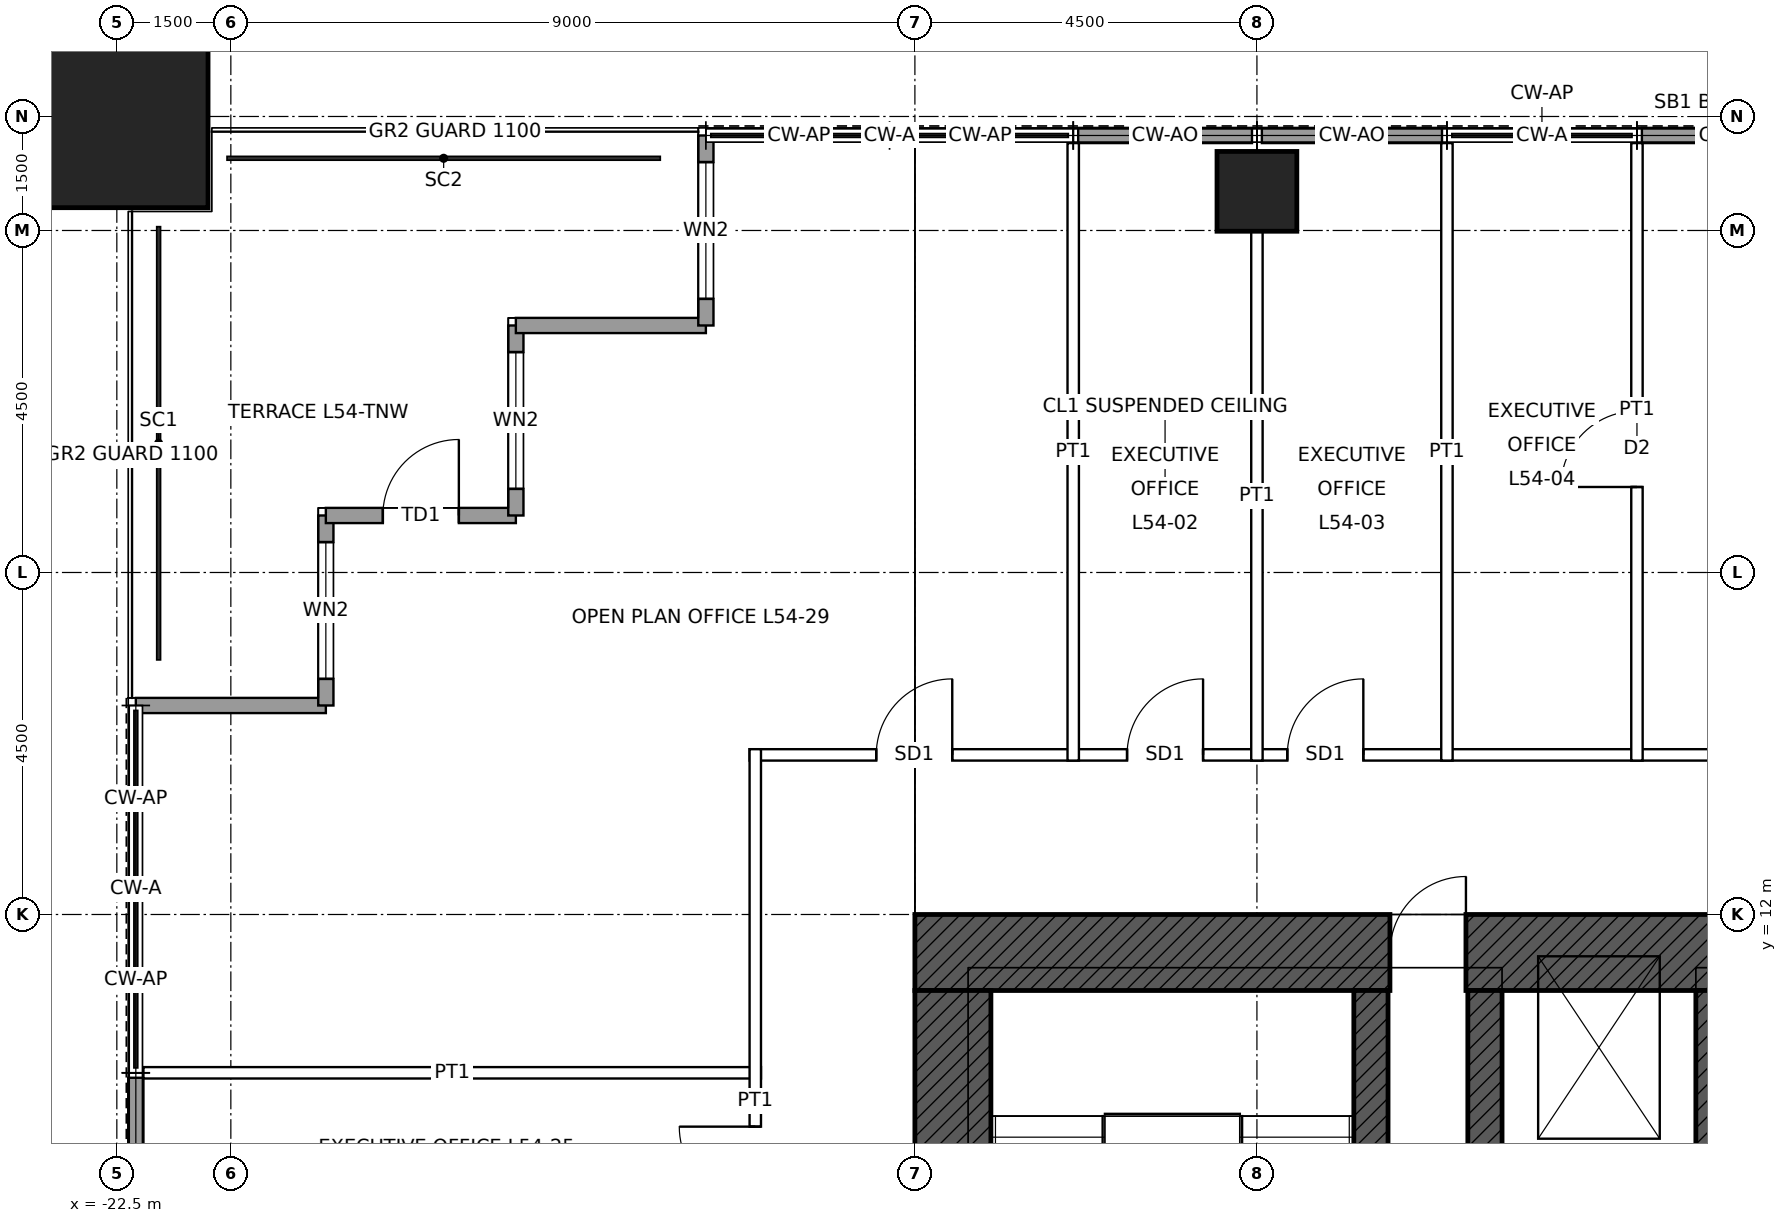
"""IFC4 building model, lengths in metres.
Left out: names, types, materials, properties, quantities, classifications, styles, units other than length and angle.
Written with IfcOpenShell. Run it as: python <this file> out.ifc"""

import sys

from ifc_helpers import new_model, si_unit, direction, frame, frame_2d, origin, origin_2d, place, context, subcontext, project, spatial, rectangle, hollow_rectangle, extrude, element, fill, save


model = new_model("IFC4")
c1 = context("Model", 3, precision=1e-05, world=origin(), true_north=direction((0.0, 1.0)))
c2 = subcontext(c1, "Body", "Model", "MODEL_VIEW")
j1 = project(units=[si_unit("LENGTHUNIT", "METRE"), si_unit("PLANEANGLEUNIT", "RADIAN")], contexts=[c1])
p1 = place(None, origin())
s1 = spatial("IfcSite", under=j1, at=p1, CompositionType="ELEMENT")
p2 = place(p1, origin())
s2 = spatial("IfcBuilding", under=s1, at=p2, CompositionType="ELEMENT")
p3 = place(p2, frame((0.0, 0.0, 249.9)))
s3 = spatial("IfcBuildingStorey", under=s2, at=p3, CompositionType="ELEMENT", Elevation=249.9)
p4 = place(p3, frame((-22.5, 22.5, 0.0), z_axis=(0.0, 0.0, 1.0), x_axis=(1.0, 0.0, 0.0)))
e1 = element("IfcColumn", 1, at=p4, inside=s3, PredefinedType="COLUMN", context=c2, shape_type="SweptSolid", body=[
    extrude(hollow_rectangle(XDim=2.4, YDim=2.4, WallThickness=0.12, at=origin_2d()), origin(), (0.0, 0.0, 1.0), 4.0),
])
p5 = place(p3, frame((-7.5, 21.515, 0.0), z_axis=(0.0, 0.0, 1.0), x_axis=(1.0, 0.0, 0.0)))
e2 = element("IfcColumn", 2, at=p5, inside=s3, PredefinedType="COLUMN", context=c2, shape_type="SweptSolid", body=[
    extrude(hollow_rectangle(XDim=1.05, YDim=1.05, WallThickness=0.07, at=origin_2d()), origin(), (0.0, 0.0, 1.0), 4.0),
])
p6 = place(p3, frame((-12.0, 11.5, 0.0), z_axis=(0.0, 0.0, 1.0), x_axis=(1.0, 0.0, 0.0)))
e3 = element("IfcWall", 3, at=p6, inside=s3, PredefinedType="SHEAR", context=c2, shape_type="SweptSolid", body=[
    extrude(rectangle(XDim=24.0, YDim=1.0, at=frame_2d((12.0, 0.0))), origin(), (0.0, 0.0, 1.0), 4.0),
])
p7 = place(p6, frame((6.25, 0.0, 0.0)))
e4 = element("IfcOpeningElement", 4, at=p7, cuts=e3, PredefinedType="OPENING", context=c2, shape_type="SweptSolid", body=[
    extrude(rectangle(XDim=1.0, YDim=2.4, at=frame_2d((0.5, 1.2))), frame((0.0, 0.51, 0.0), z_axis=(0.0, -1.0, 0.0), x_axis=(1.0, 0.0, 0.0)), (0.0, 0.0, 1.0), 1.02),
])
p8 = place(p6, frame((16.75, 0.0, 0.0)))
e5 = element("IfcOpeningElement", 5, at=p8, cuts=e3, PredefinedType="OPENING", context=c2, shape_type="SweptSolid", body=[
    extrude(rectangle(XDim=1.0, YDim=2.4, at=frame_2d((0.5, 1.2))), frame((0.0, 0.51, 0.0), z_axis=(0.0, -1.0, 0.0), x_axis=(1.0, 0.0, 0.0)), (0.0, 0.0, 1.0), 1.02),
])
p9 = place(p3, frame((-11.5, -11.0, 0.0), z_axis=(0.0, 0.0, 1.0), x_axis=(0.0, 1.0, 0.0)))
e6 = element("IfcWall", 6, at=p9, inside=s3, PredefinedType="SHEAR", context=c2, shape_type="SweptSolid", body=[
    extrude(rectangle(XDim=22.0, YDim=1.0, at=frame_2d((11.0, 0.0))), origin(), (0.0, 0.0, 1.0), 4.0),
])
p10 = place(p9, frame((10.5, 0.0, 0.0)))
e7 = element("IfcOpeningElement", 7, at=p10, cuts=e6, PredefinedType="OPENING", context=c2, shape_type="SweptSolid", body=[
    extrude(rectangle(XDim=1.0, YDim=2.4, at=frame_2d((0.5, 1.2))), frame((0.0, 0.51, 0.0), z_axis=(0.0, -1.0, 0.0), x_axis=(1.0, 0.0, 0.0)), (0.0, 0.0, 1.0), 1.02),
])
p11 = place(p3, frame((-6.0, 4.5, 0.0), z_axis=(0.0, 0.0, 1.0), x_axis=(0.0, 1.0, 0.0)))
e8 = element("IfcWall", 8, at=p11, inside=s3, PredefinedType="SHEAR", context=c2, shape_type="SweptSolid", body=[
    extrude(rectangle(XDim=6.5, YDim=0.45, at=frame_2d((3.25, 0.0))), origin(), (0.0, 0.0, 1.0), 4.0),
])
p12 = place(p11, frame((0.6, 0.0, 0.0)))
e9 = element("IfcOpeningElement", 9, at=p12, cuts=e8, PredefinedType="OPENING", context=c2, shape_type="SweptSolid", body=[
    extrude(rectangle(XDim=1.0, YDim=2.1, at=frame_2d((0.5, 1.05))), frame((0.0, 0.235, 0.0), z_axis=(0.0, -1.0, 0.0), x_axis=(1.0, 0.0, 0.0)), (0.0, 0.0, 1.0), 0.47),
])
for number, where, z_axis, x_axis in (
    (10, (-4.5, 8.5, 0.0), (0.0, 0.0, 1.0), (0.0, 1.0, 0.0)),
    (11, (-1.5, 8.5, 0.0), (0.0, 0.0, 1.0), (0.0, 1.0, 0.0)),
):
    element("IfcWall", number, at=place(p3, frame(where, z_axis=z_axis, x_axis=x_axis)), inside=s3, PredefinedType="SHEAR", context=c2, shape_type="SweptSolid", body=[
        extrude(rectangle(XDim=2.5, YDim=0.45, at=frame_2d((1.25, 0.0))), origin(), (0.0, 0.0, 1.0), 4.0),
    ])
p13 = place(p3, frame((-22.25, 14.75, 0.0), z_axis=(0.0, 0.0, 1.0), x_axis=(1.0, 0.0, 0.0)))
e12 = element("IfcWall", 12, at=p13, inside=s3, PredefinedType="SOLIDWALL", context=c2, shape_type="SweptSolid", body=[
    extrude(rectangle(XDim=2.5, YDim=0.2, at=frame_2d((1.25, 0.0))), origin(), (0.0, 0.0, 1.0), 3.75),
])
p14 = place(p3, frame((-19.75, 14.75, 0.0), z_axis=(0.0, 0.0, 1.0), x_axis=(0.0, 1.0, 0.0)))
e13 = element("IfcWall", 13, at=p14, inside=s3, PredefinedType="SOLIDWALL", context=c2, shape_type="SweptSolid", body=[
    extrude(rectangle(XDim=2.5, YDim=0.2, at=frame_2d((1.25, 0.0))), origin(), (0.0, 0.0, 1.0), 3.75),
])
p15 = place(p14, frame((0.35, 0.0, 0.3)))
e14 = element("IfcOpeningElement", 14, at=p15, cuts=e13, PredefinedType="OPENING", context=c2, shape_type="SweptSolid", body=[
    extrude(rectangle(XDim=1.8, YDim=2.4, at=frame_2d((0.9, 1.2))), frame((0.0, 0.11, 0.0), z_axis=(0.0, -1.0, 0.0), x_axis=(1.0, 0.0, 0.0)), (0.0, 0.0, 1.0), 0.22),
])
p16 = place(p3, frame((-19.75, 17.25, 0.0), z_axis=(0.0, 0.0, 1.0), x_axis=(1.0, 0.0, 0.0)))
e15 = element("IfcWall", 15, at=p16, inside=s3, PredefinedType="SOLIDWALL", context=c2, shape_type="SweptSolid", body=[
    extrude(rectangle(XDim=2.5, YDim=0.2, at=frame_2d((1.25, 0.0))), origin(), (0.0, 0.0, 1.0), 3.75),
])
p17 = place(p16, frame((0.75, 0.0, 0.0)))
e16 = element("IfcOpeningElement", 16, at=p17, cuts=e15, PredefinedType="OPENING", context=c2, shape_type="SweptSolid", body=[
    extrude(rectangle(XDim=1.0, YDim=2.4, at=frame_2d((0.5, 1.2))), frame((0.0, 0.11, 0.0), z_axis=(0.0, -1.0, 0.0), x_axis=(1.0, 0.0, 0.0)), (0.0, 0.0, 1.0), 0.22),
])
p18 = place(p3, frame((-17.25, 17.25, 0.0), z_axis=(0.0, 0.0, 1.0), x_axis=(0.0, 1.0, 0.0)))
e17 = element("IfcWall", 17, at=p18, inside=s3, PredefinedType="SOLIDWALL", context=c2, shape_type="SweptSolid", body=[
    extrude(rectangle(XDim=2.5, YDim=0.2, at=frame_2d((1.25, 0.0))), origin(), (0.0, 0.0, 1.0), 3.75),
])
p19 = place(p18, frame((0.35, 0.0, 0.3)))
e18 = element("IfcOpeningElement", 18, at=p19, cuts=e17, PredefinedType="OPENING", context=c2, shape_type="SweptSolid", body=[
    extrude(rectangle(XDim=1.8, YDim=2.4, at=frame_2d((0.9, 1.2))), frame((0.0, 0.11, 0.0), z_axis=(0.0, -1.0, 0.0), x_axis=(1.0, 0.0, 0.0)), (0.0, 0.0, 1.0), 0.22),
])
p20 = place(p3, frame((-17.25, 19.75, 0.0), z_axis=(0.0, 0.0, 1.0), x_axis=(1.0, 0.0, 0.0)))
e19 = element("IfcWall", 19, at=p20, inside=s3, PredefinedType="SOLIDWALL", context=c2, shape_type="SweptSolid", body=[
    extrude(rectangle(XDim=2.5, YDim=0.2, at=frame_2d((1.25, 0.0))), origin(), (0.0, 0.0, 1.0), 3.75),
])
p21 = place(p3, frame((-14.75, 19.75, 0.0), z_axis=(0.0, 0.0, 1.0), x_axis=(0.0, 1.0, 0.0)))
e20 = element("IfcWall", 20, at=p21, inside=s3, PredefinedType="SOLIDWALL", context=c2, shape_type="SweptSolid", body=[
    extrude(rectangle(XDim=2.5, YDim=0.2, at=frame_2d((1.25, 0.0))), origin(), (0.0, 0.0, 1.0), 3.75),
])
p22 = place(p21, frame((0.35, 0.0, 0.3)))
e21 = element("IfcOpeningElement", 21, at=p22, cuts=e20, PredefinedType="OPENING", context=c2, shape_type="SweptSolid", body=[
    extrude(rectangle(XDim=1.8, YDim=2.4, at=frame_2d((0.9, 1.2))), frame((0.0, 0.11, 0.0), z_axis=(0.0, -1.0, 0.0), x_axis=(1.0, 0.0, 0.0)), (0.0, 0.0, 1.0), 0.22),
])
p23 = place(p3, frame((-9.852, 22.25, 0.0), z_axis=(0.0, 0.0, 1.0), x_axis=(1.0, 0.0, 0.0)))
e22 = element("IfcWall", 22, at=p23, inside=s3, PredefinedType="SOLIDWALL", context=c2, shape_type="SweptSolid", body=[
    extrude(rectangle(XDim=2.287, YDim=0.2, at=frame_2d((1.144, 0.0))), origin(), (0.0, 0.0, 1.0), 3.75),
])
for number, where, z_axis, x_axis in (
    (23, (-7.435, 22.25, 0.0), (0.0, 0.0, 1.0), (1.0, 0.0, 0.0)),
    (24, (-2.435, 22.25, 0.0), (0.0, 0.0, 1.0), (1.0, 0.0, 0.0)),
):
    element("IfcWall", number, at=place(p3, frame(where, z_axis=z_axis, x_axis=x_axis)), inside=s3, PredefinedType="SOLIDWALL", context=c2, shape_type="SweptSolid", body=[
        extrude(rectangle(XDim=2.37, YDim=0.2, at=frame_2d((1.185, 0.0))), origin(), (0.0, 0.0, 1.0), 3.75),
    ])
p24 = place(p3, frame((-22.25, 7.565, 0.0), z_axis=(0.0, 0.0, 1.0), x_axis=(0.0, 1.0, 0.0)))
e25 = element("IfcWall", 25, at=p24, inside=s3, PredefinedType="SOLIDWALL", context=c2, shape_type="SweptSolid", body=[
    extrude(rectangle(XDim=2.287, YDim=0.2, at=frame_2d((1.144, 0.0))), origin(), (0.0, 0.0, 1.0), 3.75),
])
p25 = place(p3, frame((-22.15, 9.917, 0.0), z_axis=(0.0, 0.0, 1.0), x_axis=(1.0, 0.0, 0.0)))
e26 = element("IfcWall", 26, at=p25, inside=s3, PredefinedType="PARTITIONING", context=c2, shape_type="SweptSolid", body=[
    extrude(rectangle(XDim=8.125, YDim=0.15, at=frame_2d((4.062, 0.0))), origin(), (0.0, 0.0, 1.0), 3.75),
])
p26 = place(p3, frame((-14.175, 14.1, 0.0), z_axis=(0.0, 0.0, 1.0), x_axis=(1.0, 0.0, 0.0)))
e27 = element("IfcWall", 27, at=p26, inside=s3, PredefinedType="PARTITIONING", context=c2, shape_type="SweptSolid", body=[
    extrude(rectangle(XDim=28.35, YDim=0.15, at=frame_2d((14.175, 0.0))), origin(), (0.0, 0.0, 1.0), 3.75),
])
p27 = place(p26, frame((4.967, 0.0, 0.0)))
e28 = element("IfcOpeningElement", 28, at=p27, cuts=e27, PredefinedType="OPENING", context=c2, shape_type="SweptSolid", body=[
    extrude(rectangle(XDim=1.0, YDim=2.4, at=frame_2d((0.5, 1.2))), frame((0.0, 0.085, 0.0), z_axis=(0.0, -1.0, 0.0), x_axis=(1.0, 0.0, 0.0)), (0.0, 0.0, 1.0), 0.17),
])
p28 = place(p26, frame((7.075, 0.0, 0.0)))
e29 = element("IfcOpeningElement", 29, at=p28, cuts=e27, PredefinedType="OPENING", context=c2, shape_type="SweptSolid", body=[
    extrude(rectangle(XDim=1.0, YDim=2.4, at=frame_2d((0.5, 1.2))), frame((0.0, 0.085, 0.0), z_axis=(0.0, -1.0, 0.0), x_axis=(1.0, 0.0, 0.0)), (0.0, 0.0, 1.0), 0.17),
])
p29 = place(p26, frame((13.675, 0.0, 0.0)))
e30 = element("IfcOpeningElement", 30, at=p29, cuts=e27, PredefinedType="OPENING", context=c2, shape_type="SweptSolid", body=[
    extrude(rectangle(XDim=1.0, YDim=2.4, at=frame_2d((0.5, 1.2))), frame((0.0, 0.085, 0.0), z_axis=(0.0, -1.0, 0.0), x_axis=(1.0, 0.0, 0.0)), (0.0, 0.0, 1.0), 0.17),
])
p30 = place(p26, frame((20.275, 0.0, 0.0)))
e31 = element("IfcOpeningElement", 31, at=p30, cuts=e27, PredefinedType="OPENING", context=c2, shape_type="SweptSolid", body=[
    extrude(rectangle(XDim=1.0, YDim=2.4, at=frame_2d((0.5, 1.2))), frame((0.0, 0.085, 0.0), z_axis=(0.0, -1.0, 0.0), x_axis=(1.0, 0.0, 0.0)), (0.0, 0.0, 1.0), 0.17),
])
p31 = place(p26, frame((22.384, 0.0, 0.0)))
e32 = element("IfcOpeningElement", 32, at=p31, cuts=e27, PredefinedType="OPENING", context=c2, shape_type="SweptSolid", body=[
    extrude(rectangle(XDim=1.0, YDim=2.4, at=frame_2d((0.5, 1.2))), frame((0.0, 0.085, 0.0), z_axis=(0.0, -1.0, 0.0), x_axis=(1.0, 0.0, 0.0)), (0.0, 0.0, 1.0), 0.17),
])
p32 = place(p26, frame((25.684, 0.0, 0.0)))
e33 = element("IfcOpeningElement", 33, at=p32, cuts=e27, PredefinedType="OPENING", context=c2, shape_type="SweptSolid", body=[
    extrude(rectangle(XDim=1.0, YDim=2.4, at=frame_2d((0.5, 1.2))), frame((0.0, 0.085, 0.0), z_axis=(0.0, -1.0, 0.0), x_axis=(1.0, 0.0, 0.0)), (0.0, 0.0, 1.0), 0.17),
])
p33 = place(p26, frame((1.667, 0.0, 0.0)))
e34 = element("IfcOpeningElement", 34, at=p33, cuts=e27, PredefinedType="OPENING", context=c2, shape_type="SweptSolid", body=[
    extrude(rectangle(XDim=1.0, YDim=2.4, at=frame_2d((0.5, 1.2))), frame((0.0, 0.085, 0.0), z_axis=(0.0, -1.0, 0.0), x_axis=(1.0, 0.0, 0.0)), (0.0, 0.0, 1.0), 0.17),
])
p34 = place(p3, frame((-14.1, 4.925, 0.0), z_axis=(0.0, 0.0, 1.0), x_axis=(0.0, 1.0, 0.0)))
e35 = element("IfcWall", 35, at=p34, inside=s3, PredefinedType="PARTITIONING", context=c2, shape_type="SweptSolid", body=[
    extrude(rectangle(XDim=9.25, YDim=0.15, at=frame_2d((4.625, 0.0))), origin(), (0.0, 0.0, 1.0), 3.75),
])
p35 = place(p34, frame((0.825, 0.0, 0.0)))
e36 = element("IfcOpeningElement", 36, at=p35, cuts=e35, PredefinedType="OPENING", context=c2, shape_type="SweptSolid", body=[
    extrude(rectangle(XDim=1.0, YDim=2.4, at=frame_2d((0.5, 1.2))), frame((0.0, 0.085, 0.0), z_axis=(0.0, -1.0, 0.0), x_axis=(1.0, 0.0, 0.0)), (0.0, 0.0, 1.0), 0.17),
])
p36 = place(p34, frame((3.283, 0.0, 0.0)))
e37 = element("IfcOpeningElement", 37, at=p36, cuts=e35, PredefinedType="OPENING", context=c2, shape_type="SweptSolid", body=[
    extrude(rectangle(XDim=1.0, YDim=2.4, at=frame_2d((0.5, 1.2))), frame((0.0, 0.085, 0.0), z_axis=(0.0, -1.0, 0.0), x_axis=(1.0, 0.0, 0.0)), (0.0, 0.0, 1.0), 0.17),
])
p37 = place(p3, frame((-9.917, 14.025, 0.0), z_axis=(0.0, 0.0, 1.0), x_axis=(0.0, 1.0, 0.0)))
e38 = element("IfcWall", 38, at=p37, inside=s3, PredefinedType="PARTITIONING", context=c2, shape_type="SweptSolid", body=[
    extrude(rectangle(XDim=8.125, YDim=0.15, at=frame_2d((4.062, 0.0))), origin(), (0.0, 0.0, 1.0), 3.75),
])
p38 = place(p3, frame((-7.5, 14.025, 0.0), z_axis=(0.0, 0.0, 1.0), x_axis=(0.0, 1.0, 0.0)))
e39 = element("IfcWall", 39, at=p38, inside=s3, PredefinedType="PARTITIONING", context=c2, shape_type="SweptSolid", body=[
    extrude(rectangle(XDim=6.965, YDim=0.15, at=frame_2d((3.482, 0.0))), origin(), (0.0, 0.0, 1.0), 3.75),
])
p39 = place(p3, frame((-5.0, 14.025, 0.0), z_axis=(0.0, 0.0, 1.0), x_axis=(0.0, 1.0, 0.0)))
e40 = element("IfcWall", 40, at=p39, inside=s3, PredefinedType="PARTITIONING", context=c2, shape_type="SweptSolid", body=[
    extrude(rectangle(XDim=8.125, YDim=0.15, at=frame_2d((4.062, 0.0))), origin(), (0.0, 0.0, 1.0), 3.75),
])
p40 = place(p3, frame((-2.5, 14.025, 0.0), z_axis=(0.0, 0.0, 1.0), x_axis=(0.0, 1.0, 0.0)))
e41 = element("IfcWall", 41, at=p40, inside=s3, PredefinedType="PARTITIONING", context=c2, shape_type="SweptSolid", body=[
    extrude(rectangle(XDim=8.125, YDim=0.15, at=frame_2d((4.062, 0.0))), origin(), (0.0, 0.0, 1.0), 3.75),
])
p41 = place(p40, frame((3.6, 0.0, 0.0)))
e42 = element("IfcOpeningElement", 42, at=p41, cuts=e41, PredefinedType="OPENING", context=c2, shape_type="SweptSolid", body=[
    extrude(rectangle(XDim=1.0, YDim=2.1, at=frame_2d((0.5, 1.05))), frame((0.0, 0.085, 0.0), z_axis=(0.0, -1.0, 0.0), x_axis=(1.0, 0.0, 0.0)), (0.0, 0.0, 1.0), 0.17),
])
p42 = place(p15, origin())
e43 = element("IfcWindow", 43, at=p42, inside=s3, PartitioningType="SINGLE_PANEL", PredefinedType="WINDOW", context=c2, shape_type="SweptSolid", body=[
    extrude(rectangle(XDim=1.8, YDim=2.4, at=frame_2d((0.9, 1.2))), frame((0.0, 0.03, 0.0), z_axis=(0.0, -1.0, 0.0), x_axis=(1.0, 0.0, 0.0)), (0.0, 0.0, 1.0), 0.06),
])
fill(e14, e43)
p43 = place(p17, origin())
e44 = element("IfcDoor", 44, at=p43, inside=s3, OperationType="SINGLE_SWING_RIGHT", PredefinedType="DOOR", context=c2, shape_type="SweptSolid", body=[
    extrude(rectangle(XDim=1.0, YDim=2.4, at=frame_2d((0.5, 1.2))), frame((0.0, 0.025, 0.0), z_axis=(0.0, -1.0, 0.0), x_axis=(1.0, 0.0, 0.0)), (0.0, 0.0, 1.0), 0.05),
])
fill(e16, e44)
p44 = place(p19, origin())
e45 = element("IfcWindow", 45, at=p44, inside=s3, PartitioningType="SINGLE_PANEL", PredefinedType="WINDOW", context=c2, shape_type="SweptSolid", body=[
    extrude(rectangle(XDim=1.8, YDim=2.4, at=frame_2d((0.9, 1.2))), frame((0.0, 0.03, 0.0), z_axis=(0.0, -1.0, 0.0), x_axis=(1.0, 0.0, 0.0)), (0.0, 0.0, 1.0), 0.06),
])
fill(e18, e45)
p45 = place(p22, origin())
e46 = element("IfcWindow", 46, at=p45, inside=s3, PartitioningType="SINGLE_PANEL", PredefinedType="WINDOW", context=c2, shape_type="SweptSolid", body=[
    extrude(rectangle(XDim=1.8, YDim=2.4, at=frame_2d((0.9, 1.2))), frame((0.0, 0.03, 0.0), z_axis=(0.0, -1.0, 0.0), x_axis=(1.0, 0.0, 0.0)), (0.0, 0.0, 1.0), 0.06),
])
fill(e21, e46)
p46 = place(p7, origin())
e47 = element("IfcDoor", 47, at=p46, inside=s3, OperationType="SINGLE_SWING_RIGHT", PredefinedType="DOOR", context=c2, shape_type="SweptSolid", body=[
    extrude(rectangle(XDim=1.0, YDim=2.4, at=frame_2d((0.5, 1.2))), frame((0.0, 0.485, 0.0), z_axis=(0.0, -1.0, 0.0), x_axis=(1.0, 0.0, 0.0)), (0.0, 0.0, 1.0), 0.05),
])
fill(e4, e47)
p47 = place(p27, origin())
e48 = element("IfcDoor", 48, at=p47, inside=s3, OperationType="SINGLE_SWING_RIGHT", PredefinedType="DOOR", context=c2, shape_type="SweptSolid", body=[
    extrude(rectangle(XDim=1.0, YDim=2.4, at=frame_2d((0.5, 1.2))), frame((0.0, 0.025, 0.0), z_axis=(0.0, -1.0, 0.0), x_axis=(1.0, 0.0, 0.0)), (0.0, 0.0, 1.0), 0.05),
])
fill(e28, e48)
p48 = place(p28, origin())
e49 = element("IfcDoor", 49, at=p48, inside=s3, OperationType="SINGLE_SWING_RIGHT", PredefinedType="DOOR", context=c2, shape_type="SweptSolid", body=[
    extrude(rectangle(XDim=1.0, YDim=2.4, at=frame_2d((0.5, 1.2))), frame((0.0, 0.025, 0.0), z_axis=(0.0, -1.0, 0.0), x_axis=(1.0, 0.0, 0.0)), (0.0, 0.0, 1.0), 0.05),
])
fill(e29, e49)
p49 = place(p41, origin())
e50 = element("IfcDoor", 50, at=p49, inside=s3, OperationType="SINGLE_SWING_LEFT", PredefinedType="DOOR", context=c2, shape_type="SweptSolid", body=[
    extrude(rectangle(XDim=1.0, YDim=2.1, at=frame_2d((0.5, 1.05))), frame((0.0, 0.025, 0.0), z_axis=(0.0, -1.0, 0.0), x_axis=(1.0, 0.0, 0.0)), (0.0, 0.0, 1.0), 0.05),
])
fill(e42, e50)
p50 = place(p36, origin())
e51 = element("IfcDoor", 51, at=p50, inside=s3, OperationType="SINGLE_SWING_RIGHT", PredefinedType="DOOR", context=c2, shape_type="SweptSolid", body=[
    extrude(rectangle(XDim=1.0, YDim=2.4, at=frame_2d((0.5, 1.2))), frame((0.0, 0.025, 0.0), z_axis=(0.0, -1.0, 0.0), x_axis=(1.0, 0.0, 0.0)), (0.0, 0.0, 1.0), 0.05),
])
fill(e37, e51)
p51 = place(p33, origin())
e52 = element("IfcDoor", 52, at=p51, inside=s3, OperationType="SINGLE_SWING_RIGHT", PredefinedType="DOOR", context=c2, shape_type="SweptSolid", body=[
    extrude(rectangle(XDim=1.0, YDim=2.4, at=frame_2d((0.5, 1.2))), frame((0.0, 0.025, 0.0), z_axis=(0.0, -1.0, 0.0), x_axis=(1.0, 0.0, 0.0)), (0.0, 0.0, 1.0), 0.05),
])
fill(e34, e52)
save(model, sys.argv[1])
